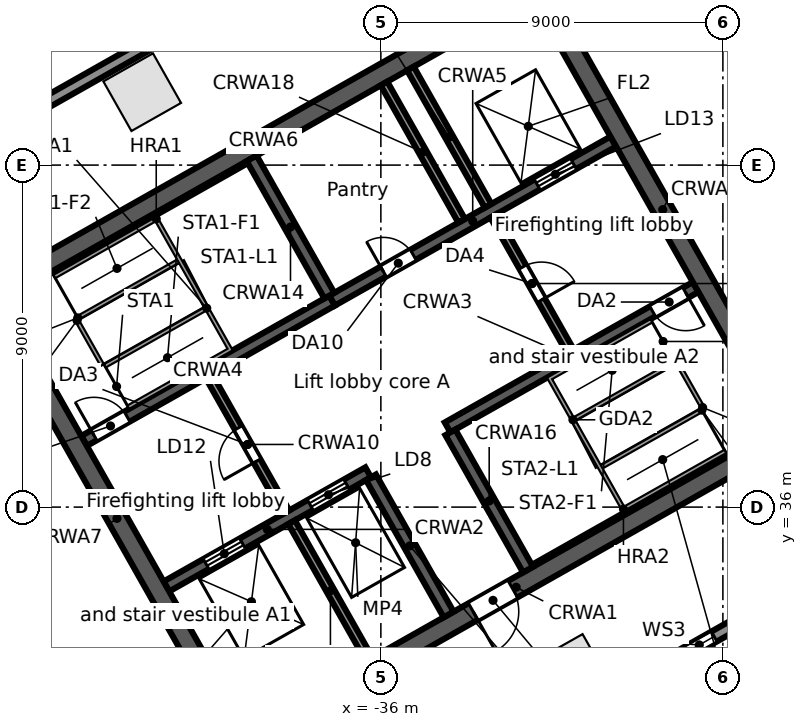
"""IFC4 building model, lengths in metres.
Left out: names, types, materials, properties, quantities, classifications, styles, units other than length and angle.
Written with IfcOpenShell. Run it as: python <this file> out.ifc"""

import sys

from ifc_helpers import new_model, si_unit, direction, frame, frame_2d, origin, origin_2d, place, context, subcontext, project, spatial, rectangle, extrude, element, fill, save


model = new_model("IFC4")
c1 = context("Model", 3, precision=1e-05, world=origin(), true_north=direction((0.0, 1.0)))
c2 = subcontext(c1, "Body", "Model", "MODEL_VIEW")
j1 = project(units=[si_unit("LENGTHUNIT", "METRE"), si_unit("PLANEANGLEUNIT", "RADIAN")], contexts=[c1])
p1 = place(None, origin())
s1 = spatial("IfcSite", under=j1, at=p1, CompositionType="ELEMENT")
p2 = place(p1, origin())
s2 = spatial("IfcBuilding", under=s1, at=p2, CompositionType="ELEMENT")
p3 = place(p2, frame((0.0, 0.0, 198.9)))
s3 = spatial("IfcBuildingStorey", under=s2, at=p3, CompositionType="ELEMENT", Elevation=198.9)
for number, where, z_axis, x_axis in (
    (1, (-42.28, 46.919, 0.0), (0.0, 0.0, 1.0), (-0.87, -0.492, 0.0)),
    (2, (-30.976, 31.635, 0.0), (0.0, 0.0, 1.0), (0.87, 0.492, 0.0)),
):
    element("IfcColumn", number, at=place(p3, frame(where, z_axis=z_axis, x_axis=x_axis)), inside=s3, PredefinedType="COLUMN", context=c2, shape_type="SweptSolid", body=[
        extrude(rectangle(XDim=1.5, YDim=1.5, at=origin_2d()), origin(), (0.0, 0.0, 1.0), 4.0),
    ])
p4 = place(p3, frame((-0.055, 47.969, 0.0), z_axis=(0.0, 0.0, 1.0), x_axis=(-0.870355730478, -0.492423499058, 0.0)))
e3 = element("IfcWall", 3, at=p4, inside=s3, PredefinedType="STANDARD", context=c2, shape_type="SweptSolid", body=[
    extrude(rectangle(XDim=43.75, YDim=0.3, at=frame_2d((21.875, 0.0))), origin(), (0.0, 0.0, 1.0), 3.65),
])
p5 = place(p4, frame((39.977, 0.0, 0.6)))
e4 = element("IfcOpeningElement", 4, at=p5, cuts=e3, PredefinedType="OPENING", context=c2, shape_type="SweptSolid", body=[
    extrude(rectangle(XDim=0.9, YDim=2.4, at=frame_2d((0.45, 1.2))), frame((0.0, 0.16, 0.0), z_axis=(0.0, -1.0, 0.0), x_axis=(1.0, 0.0, 0.0)), (0.0, 0.0, 1.0), 0.32),
])
p6 = place(p4, frame((37.338, 0.0, 0.0)))
e5 = element("IfcOpeningElement", 5, at=p6, cuts=e3, PredefinedType="OPENING", context=c2, shape_type="SweptSolid", body=[
    extrude(rectangle(XDim=1.8, YDim=2.4, at=frame_2d((0.9, 1.2))), frame((0.0, 0.16, 0.0), z_axis=(0.0, -1.0, 0.0), x_axis=(1.0, 0.0, 0.0)), (0.0, 0.0, 1.0), 0.32),
])
p7 = place(p4, frame((31.222, 0.0, 0.6)))
e6 = element("IfcOpeningElement", 6, at=p7, cuts=e3, PredefinedType="OPENING", context=c2, shape_type="SweptSolid", body=[
    extrude(rectangle(XDim=0.9, YDim=2.4, at=frame_2d((0.45, 1.2))), frame((0.0, 0.16, 0.0), z_axis=(0.0, -1.0, 0.0), x_axis=(1.0, 0.0, 0.0)), (0.0, 0.0, 1.0), 0.32),
])
p8 = place(p4, frame((28.584, 0.0, 0.0)))
e7 = element("IfcOpeningElement", 7, at=p8, cuts=e3, PredefinedType="OPENING", context=c2, shape_type="SweptSolid", body=[
    extrude(rectangle(XDim=1.8, YDim=2.4, at=frame_2d((0.9, 1.2))), frame((0.0, 0.16, 0.0), z_axis=(0.0, -1.0, 0.0), x_axis=(1.0, 0.0, 0.0)), (0.0, 0.0, 1.0), 0.32),
])
p9 = place(p4, frame((22.468, 0.0, 0.6)))
e8 = element("IfcOpeningElement", 8, at=p9, cuts=e3, PredefinedType="OPENING", context=c2, shape_type="SweptSolid", body=[
    extrude(rectangle(XDim=0.9, YDim=2.4, at=frame_2d((0.45, 1.2))), frame((0.0, 0.16, 0.0), z_axis=(0.0, -1.0, 0.0), x_axis=(1.0, 0.0, 0.0)), (0.0, 0.0, 1.0), 0.32),
])
p10 = place(p4, frame((19.829, 0.0, 0.0)))
e9 = element("IfcOpeningElement", 9, at=p10, cuts=e3, PredefinedType="OPENING", context=c2, shape_type="SweptSolid", body=[
    extrude(rectangle(XDim=1.8, YDim=2.4, at=frame_2d((0.9, 1.2))), frame((0.0, 0.16, 0.0), z_axis=(0.0, -1.0, 0.0), x_axis=(1.0, 0.0, 0.0)), (0.0, 0.0, 1.0), 0.32),
])
p11 = place(p4, frame((13.713, 0.0, 0.6)))
e10 = element("IfcOpeningElement", 10, at=p11, cuts=e3, PredefinedType="OPENING", context=c2, shape_type="SweptSolid", body=[
    extrude(rectangle(XDim=0.9, YDim=2.4, at=frame_2d((0.45, 1.2))), frame((0.0, 0.16, 0.0), z_axis=(0.0, -1.0, 0.0), x_axis=(1.0, 0.0, 0.0)), (0.0, 0.0, 1.0), 0.32),
])
p12 = place(p4, frame((11.075, 0.0, 0.0)))
e11 = element("IfcOpeningElement", 11, at=p12, cuts=e3, PredefinedType="OPENING", context=c2, shape_type="SweptSolid", body=[
    extrude(rectangle(XDim=1.8, YDim=2.4, at=frame_2d((0.9, 1.2))), frame((0.0, 0.16, 0.0), z_axis=(0.0, -1.0, 0.0), x_axis=(1.0, 0.0, 0.0)), (0.0, 0.0, 1.0), 0.32),
])
p13 = place(p4, frame((4.959, 0.0, 0.6)))
e12 = element("IfcOpeningElement", 12, at=p13, cuts=e3, PredefinedType="OPENING", context=c2, shape_type="SweptSolid", body=[
    extrude(rectangle(XDim=0.9, YDim=2.4, at=frame_2d((0.45, 1.2))), frame((0.0, 0.16, 0.0), z_axis=(0.0, -1.0, 0.0), x_axis=(1.0, 0.0, 0.0)), (0.0, 0.0, 1.0), 0.32),
])
p14 = place(p4, frame((2.32, 0.0, 0.0)))
e13 = element("IfcOpeningElement", 13, at=p14, cuts=e3, PredefinedType="OPENING", context=c2, shape_type="SweptSolid", body=[
    extrude(rectangle(XDim=1.8, YDim=2.4, at=frame_2d((0.9, 1.2))), frame((0.0, 0.16, 0.0), z_axis=(0.0, -1.0, 0.0), x_axis=(1.0, 0.0, 0.0)), (0.0, 0.0, 1.0), 0.32),
])
p15 = place(p3, frame((-58.745, 38.764, 0.0), z_axis=(0.0, 0.0, 1.0), x_axis=(0.870355811726, 0.492423355453, 0.0)))
e14 = element("IfcWall", 14, at=p15, inside=s3, PredefinedType="STANDARD", context=c2, shape_type="SweptSolid", body=[
    extrude(rectangle(XDim=64.025, YDim=0.3, at=frame_2d((32.013, 0.0))), origin(), (0.0, 0.0, 1.0), 3.65),
])
p16 = place(p15, frame((60.122, 0.0, 0.6)))
e15 = element("IfcOpeningElement", 15, at=p16, cuts=e14, PredefinedType="OPENING", context=c2, shape_type="SweptSolid", body=[
    extrude(rectangle(XDim=0.9, YDim=2.4, at=frame_2d((0.45, 1.2))), frame((0.0, 0.16, 0.0), z_axis=(0.0, -1.0, 0.0), x_axis=(1.0, 0.0, 0.0)), (0.0, 0.0, 1.0), 0.32),
])
p17 = place(p15, frame((50.992, 0.0, 0.6)))
e16 = element("IfcOpeningElement", 16, at=p17, cuts=e14, PredefinedType="OPENING", context=c2, shape_type="SweptSolid", body=[
    extrude(rectangle(XDim=0.9, YDim=2.4, at=frame_2d((0.45, 1.2))), frame((0.0, 0.16, 0.0), z_axis=(0.0, -1.0, 0.0), x_axis=(1.0, 0.0, 0.0)), (0.0, 0.0, 1.0), 0.32),
])
p18 = place(p15, frame((41.862, 0.0, 0.6)))
e17 = element("IfcOpeningElement", 17, at=p18, cuts=e14, PredefinedType="OPENING", context=c2, shape_type="SweptSolid", body=[
    extrude(rectangle(XDim=0.9, YDim=2.4, at=frame_2d((0.45, 1.2))), frame((0.0, 0.16, 0.0), z_axis=(0.0, -1.0, 0.0), x_axis=(1.0, 0.0, 0.0)), (0.0, 0.0, 1.0), 0.32),
])
p19 = place(p15, frame((32.732, 0.0, 0.6)))
e18 = element("IfcOpeningElement", 18, at=p19, cuts=e14, PredefinedType="OPENING", context=c2, shape_type="SweptSolid", body=[
    extrude(rectangle(XDim=0.9, YDim=2.4, at=frame_2d((0.45, 1.2))), frame((0.0, 0.16, 0.0), z_axis=(0.0, -1.0, 0.0), x_axis=(1.0, 0.0, 0.0)), (0.0, 0.0, 1.0), 0.32),
])
p20 = place(p15, frame((23.602, 0.0, 0.6)))
e19 = element("IfcOpeningElement", 19, at=p20, cuts=e14, PredefinedType="OPENING", context=c2, shape_type="SweptSolid", body=[
    extrude(rectangle(XDim=0.9, YDim=2.4, at=frame_2d((0.45, 1.2))), frame((0.0, 0.16, 0.0), z_axis=(0.0, -1.0, 0.0), x_axis=(1.0, 0.0, 0.0)), (0.0, 0.0, 1.0), 0.32),
])
p21 = place(p15, frame((14.472, 0.0, 0.6)))
e20 = element("IfcOpeningElement", 20, at=p21, cuts=e14, PredefinedType="OPENING", context=c2, shape_type="SweptSolid", body=[
    extrude(rectangle(XDim=0.9, YDim=2.4, at=frame_2d((0.45, 1.2))), frame((0.0, 0.16, 0.0), z_axis=(0.0, -1.0, 0.0), x_axis=(1.0, 0.0, 0.0)), (0.0, 0.0, 1.0), 0.32),
])
p22 = place(p15, frame((5.342, 0.0, 0.6)))
e21 = element("IfcOpeningElement", 21, at=p22, cuts=e14, PredefinedType="OPENING", context=c2, shape_type="SweptSolid", body=[
    extrude(rectangle(XDim=0.9, YDim=2.4, at=frame_2d((0.45, 1.2))), frame((0.0, 0.16, 0.0), z_axis=(0.0, -1.0, 0.0), x_axis=(1.0, 0.0, 0.0)), (0.0, 0.0, 1.0), 0.32),
])
p23 = place(p3, frame((-44.109, 26.504, 0.0), z_axis=(0.0, 0.0, 1.0), x_axis=(-0.857169502585, 0.515034410344, 0.0)))
e22 = element("IfcWall", 22, at=p23, inside=s3, PredefinedType="STANDARD", context=c2, shape_type="SweptSolid", body=[
    extrude(rectangle(XDim=17.127, YDim=0.3, at=frame_2d((8.563, 0.0))), origin(), (0.0, 0.0, 1.0), 3.65),
])
p24 = place(p23, frame((13.403, 0.0, 0.6)))
e23 = element("IfcOpeningElement", 23, at=p24, cuts=e22, PredefinedType="OPENING", context=c2, shape_type="SweptSolid", body=[
    extrude(rectangle(XDim=0.9, YDim=2.4, at=frame_2d((0.45, 1.2))), frame((0.0, 0.16, 0.0), z_axis=(0.0, -1.0, 0.0), x_axis=(1.0, 0.0, 0.0)), (0.0, 0.0, 1.0), 0.32),
])
p25 = place(p23, frame((4.903, 0.0, 0.6)))
e24 = element("IfcOpeningElement", 24, at=p25, cuts=e22, PredefinedType="OPENING", context=c2, shape_type="SweptSolid", body=[
    extrude(rectangle(XDim=0.9, YDim=2.4, at=frame_2d((0.45, 1.2))), frame((0.0, 0.16, 0.0), z_axis=(0.0, -1.0, 0.0), x_axis=(1.0, 0.0, 0.0)), (0.0, 0.0, 1.0), 0.32),
])
p26 = place(p3, frame((-39.838, 29.705, 0.0), z_axis=(0.0, 0.0, 1.0), x_axis=(0.870350116061, 0.492433422375, 0.0)))
e25 = element("IfcWall", 25, at=p26, inside=s3, PredefinedType="SOLIDWALL", context=c2, shape_type="SweptSolid", body=[
    extrude(rectangle(XDim=17.0, YDim=0.5, at=frame_2d((8.5, 0.0))), origin(), (0.0, 0.0, 1.0), 3.65),
])
p27 = place(p26, frame((7.2, 0.0, 0.0)))
e26 = element("IfcOpeningElement", 26, at=p27, cuts=e25, PredefinedType="OPENING", context=c2, shape_type="SweptSolid", body=[
    extrude(rectangle(XDim=1.2, YDim=2.1, at=frame_2d((0.6, 1.05))), frame((0.0, 0.26, 0.0), z_axis=(0.0, -1.0, 0.0), x_axis=(1.0, 0.0, 0.0)), (0.0, 0.0, 1.0), 0.52),
])
p28 = place(p3, frame((-41.643, 33.912, 0.0), z_axis=(0.0, 0.0, 1.0), x_axis=(0.870343599782, 0.492444939378, 0.0)))
e27 = element("IfcWall", 27, at=p28, inside=s3, PredefinedType="SOLIDWALL", context=c2, shape_type="SweptSolid", body=[
    extrude(rectangle(XDim=6.1, YDim=0.3, at=frame_2d((3.05, 0.0))), origin(), (0.0, 0.0, 1.0), 3.65),
])
p29 = place(p28, frame((1.2, 0.0, 0.0)))
e28 = element("IfcOpeningElement", 28, at=p29, cuts=e27, PredefinedType="OPENING", context=c2, shape_type="SweptSolid", body=[
    extrude(rectangle(XDim=1.1, YDim=2.1, at=frame_2d((0.55, 1.05))), frame((0.0, 0.16, 0.0), z_axis=(0.0, -1.0, 0.0), x_axis=(1.0, 0.0, 0.0)), (0.0, 0.0, 1.0), 0.32),
])
p30 = place(p28, frame((4.35, 0.0, 0.0)))
e29 = element("IfcOpeningElement", 29, at=p30, cuts=e27, PredefinedType="OPENING", context=c2, shape_type="SweptSolid", body=[
    extrude(rectangle(XDim=1.1, YDim=2.1, at=frame_2d((0.55, 1.05))), frame((0.0, 0.16, 0.0), z_axis=(0.0, -1.0, 0.0), x_axis=(1.0, 0.0, 0.0)), (0.0, 0.0, 1.0), 0.32),
])
p31 = place(p3, frame((-34.245, 38.097, 0.0), z_axis=(0.0, 0.0, 1.0), x_axis=(0.870364520461, 0.492407962489, 0.0)))
e30 = element("IfcWall", 30, at=p31, inside=s3, PredefinedType="SOLIDWALL", context=c2, shape_type="SweptSolid", body=[
    extrude(rectangle(XDim=7.5, YDim=0.3, at=frame_2d((3.75, 0.0))), origin(), (0.0, 0.0, 1.0), 3.65),
])
p32 = place(p31, frame((6.2, 0.0, 0.0)))
e31 = element("IfcOpeningElement", 31, at=p32, cuts=e30, PredefinedType="OPENING", context=c2, shape_type="SweptSolid", body=[
    extrude(rectangle(XDim=1.0, YDim=2.1, at=frame_2d((0.5, 1.05))), frame((0.0, 0.16, 0.0), z_axis=(0.0, -1.0, 0.0), x_axis=(1.0, 0.0, 0.0)), (0.0, 0.0, 1.0), 0.32),
])
p33 = place(p3, frame((-43.81, 37.741, 0.0), z_axis=(0.0, 0.0, 1.0), x_axis=(0.870350569555, 0.492432620848, 0.0)))
e32 = element("IfcWall", 32, at=p33, inside=s3, PredefinedType="SOLIDWALL", context=c2, shape_type="SweptSolid", body=[
    extrude(rectangle(XDim=7.5, YDim=0.3, at=frame_2d((3.75, 0.0))), origin(), (0.0, 0.0, 1.0), 3.65),
])
p34 = place(p33, frame((0.3, 0.0, 0.0)))
e33 = element("IfcOpeningElement", 33, at=p34, cuts=e32, PredefinedType="OPENING", context=c2, shape_type="SweptSolid", body=[
    extrude(rectangle(XDim=1.0, YDim=2.1, at=frame_2d((0.5, 1.05))), frame((0.0, 0.16, 0.0), z_axis=(0.0, -1.0, 0.0), x_axis=(1.0, 0.0, 0.0)), (0.0, 0.0, 1.0), 0.32),
])
p35 = place(p3, frame((-37.282, 41.435, 0.0), z_axis=(0.0, 0.0, 1.0), x_axis=(0.870356271124, 0.492422543467, 0.0)))
e34 = element("IfcWall", 34, at=p35, inside=s3, PredefinedType="SOLIDWALL", context=c2, shape_type="SweptSolid", body=[
    extrude(rectangle(XDim=8.5, YDim=0.3, at=frame_2d((4.25, 0.0))), origin(), (0.0, 0.0, 1.0), 3.65),
])
p36 = place(p35, frame((6.2, 0.0, 0.0)))
e35 = element("IfcOpeningElement", 35, at=p36, cuts=e34, PredefinedType="OPENING", context=c2, shape_type="SweptSolid", body=[
    extrude(rectangle(XDim=1.1, YDim=2.1, at=frame_2d((0.55, 1.05))), frame((0.0, 0.16, 0.0), z_axis=(0.0, -1.0, 0.0), x_axis=(1.0, 0.0, 0.0)), (0.0, 0.0, 1.0), 0.32),
])
p37 = place(p35, frame((1.55, 0.0, 0.0)))
e36 = element("IfcOpeningElement", 36, at=p37, cuts=e34, PredefinedType="OPENING", context=c2, shape_type="SweptSolid", body=[
    extrude(rectangle(XDim=0.9, YDim=2.1, at=frame_2d((0.45, 1.05))), frame((0.0, 0.16, 0.0), z_axis=(0.0, -1.0, 0.0), x_axis=(1.0, 0.0, 0.0)), (0.0, 0.0, 1.0), 0.32),
])
p38 = place(p3, frame((-46.486, 41.455, 0.0), z_axis=(0.0, 0.0, 1.0), x_axis=(0.870353598469, 0.492427267353, 0.0)))
e37 = element("IfcWall", 37, at=p38, inside=s3, PredefinedType="SOLIDWALL", context=c2, shape_type="SweptSolid", body=[
    extrude(rectangle(XDim=17.0, YDim=0.5, at=frame_2d((8.5, 0.0))), origin(), (0.0, 0.0, 1.0), 3.65),
])
p39 = place(p3, frame((-46.145, 41.361, 0.0), z_axis=(0.0, 0.0, 1.0), x_axis=(0.492435316254, -0.870349044525, 0.0)))
e38 = element("IfcWall", 38, at=p39, inside=s3, PredefinedType="SOLIDWALL", context=c2, shape_type="SweptSolid", body=[
    extrude(rectangle(XDim=13.0, YDim=0.5, at=frame_2d((6.5, 0.0))), origin(), (0.0, 0.0, 1.0), 3.65),
])
p40 = place(p3, frame((-38.349, 35.603, 0.0), z_axis=(0.0, 0.0, 1.0), x_axis=(0.492396453737, -0.870371031427, 0.0)))
e39 = element("IfcWall", 39, at=p40, inside=s3, PredefinedType="SOLIDWALL", context=c2, shape_type="SweptSolid", body=[
    extrude(rectangle(XDim=4.15, YDim=0.2, at=frame_2d((2.075, 0.0))), origin(), (0.0, 0.0, 1.0), 3.65),
])
p41 = place(p3, frame((-40.516, 39.433, 0.0), z_axis=(0.0, 0.0, 1.0), x_axis=(0.492453559952, -0.87033872216, 0.0)))
e40 = element("IfcWall", 40, at=p41, inside=s3, PredefinedType="PARTITIONING", context=c2, shape_type="SweptSolid", body=[
    extrude(rectangle(XDim=4.1, YDim=0.2, at=frame_2d((2.05, 0.0))), origin(), (0.0, 0.0, 1.0), 3.65),
])
p42 = place(p41, frame((1.55, 0.0, 0.0)))
e41 = element("IfcOpeningElement", 41, at=p42, cuts=e40, PredefinedType="OPENING", context=c2, shape_type="SweptSolid", body=[
    extrude(rectangle(XDim=1.0, YDim=2.1, at=frame_2d((0.5, 1.05))), frame((0.0, 0.11, 0.0), z_axis=(0.0, -1.0, 0.0), x_axis=(1.0, 0.0, 0.0)), (0.0, 0.0, 1.0), 0.22),
])
for number, where, z_axis, x_axis in (
    (42, (-36.26, 36.785, 0.0), (0.0, 0.0, 1.0), (0.492, -0.87, 0.0)),
    (43, (-39.399, 45.177, 0.0), (0.0, 0.0, 1.0), (0.492, -0.87, 0.0)),
    (44, (-34.171, 37.967, 0.0), (0.0, 0.0, 1.0), (0.492, -0.87, 0.0)),
):
    element("IfcWall", number, at=place(p3, frame(where, z_axis=z_axis, x_axis=x_axis)), inside=s3, PredefinedType="SOLIDWALL", context=c2, shape_type="SweptSolid", body=[
        extrude(rectangle(XDim=4.15, YDim=0.3, at=frame_2d((2.075, 0.0))), origin(), (0.0, 0.0, 1.0), 3.65),
    ])
p43 = place(p3, frame((-35.918, 47.147, 0.0), z_axis=(0.0, 0.0, 1.0), x_axis=(0.492441017253, -0.870345818929, 0.0)))
e45 = element("IfcWall", 45, at=p43, inside=s3, PredefinedType="SOLIDWALL", context=c2, shape_type="SweptSolid", body=[
    extrude(rectangle(XDim=4.15, YDim=0.2, at=frame_2d((2.075, 0.0))), origin(), (0.0, 0.0, 1.0), 3.65),
])
p44 = place(p3, frame((-33.031, 43.667, 0.0), z_axis=(0.0, 0.0, 1.0), x_axis=(0.492408451753, -0.87036424366, 0.0)))
e46 = element("IfcWall", 46, at=p44, inside=s3, PredefinedType="PARTITIONING", context=c2, shape_type="SweptSolid", body=[
    extrude(rectangle(XDim=4.1, YDim=0.2, at=frame_2d((2.05, 0.0))), origin(), (0.0, 0.0, 1.0), 3.65),
])
p45 = place(p44, frame((1.55, 0.0, 0.0)))
e47 = element("IfcOpeningElement", 47, at=p45, cuts=e46, PredefinedType="OPENING", context=c2, shape_type="SweptSolid", body=[
    extrude(rectangle(XDim=1.0, YDim=2.1, at=frame_2d((0.5, 1.05))), frame((0.0, 0.11, 0.0), z_axis=(0.0, -1.0, 0.0), x_axis=(1.0, 0.0, 0.0)), (0.0, 0.0, 1.0), 0.22),
])
p46 = place(p3, frame((-35.222, 47.541, 0.0), z_axis=(0.0, 0.0, 1.0), x_axis=(0.492421666909, -0.870356767055, 0.0)))
e48 = element("IfcWall", 48, at=p46, inside=s3, PredefinedType="SOLIDWALL", context=c2, shape_type="SweptSolid", body=[
    extrude(rectangle(XDim=4.15, YDim=0.2, at=frame_2d((2.075, 0.0))), origin(), (0.0, 0.0, 1.0), 3.65),
])
p47 = place(p3, frame((-31.784, 49.486, 0.0), z_axis=(0.0, 0.0, 1.0), x_axis=(0.492435316254, -0.870349044525, 0.0)))
e49 = element("IfcWall", 49, at=p47, inside=s3, PredefinedType="SOLIDWALL", context=c2, shape_type="SweptSolid", body=[
    extrude(rectangle(XDim=13.0, YDim=0.5, at=frame_2d((6.5, 0.0))), origin(), (0.0, 0.0, 1.0), 3.65),
])
p48 = place(p7, origin())
e50 = element("IfcWindow", 50, at=p48, inside=s3, PartitioningType="SINGLE_PANEL", PredefinedType="WINDOW", context=c2, shape_type="SweptSolid", body=[
    extrude(rectangle(XDim=0.9, YDim=2.4, at=frame_2d((0.45, 1.2))), frame((0.0, 0.03, 0.0), z_axis=(0.0, -1.0, 0.0), x_axis=(1.0, 0.0, 0.0)), (0.0, 0.0, 1.0), 0.06),
])
fill(e6, e50)
p49 = place(p36, origin())
e51 = element("IfcDoor", 51, at=p49, inside=s3, OperationType="DOUBLE_DOOR_SLIDING", PredefinedType="DOOR", context=c2, shape_type="SweptSolid", body=[
    extrude(rectangle(XDim=1.1, YDim=2.1, at=frame_2d((0.55, 1.05))), frame((0.0, 0.025, 0.0), z_axis=(0.0, -1.0, 0.0), x_axis=(1.0, 0.0, 0.0)), (0.0, 0.0, 1.0), 0.05),
])
fill(e35, e51)
p50 = place(p29, origin())
e52 = element("IfcDoor", 52, at=p50, inside=s3, OperationType="DOUBLE_DOOR_SLIDING", PredefinedType="DOOR", context=c2, shape_type="SweptSolid", body=[
    extrude(rectangle(XDim=1.1, YDim=2.1, at=frame_2d((0.55, 1.05))), frame((0.0, 0.025, 0.0), z_axis=(0.0, -1.0, 0.0), x_axis=(1.0, 0.0, 0.0)), (0.0, 0.0, 1.0), 0.05),
])
fill(e28, e52)
p51 = place(p30, origin())
e53 = element("IfcDoor", 53, at=p51, inside=s3, OperationType="DOUBLE_DOOR_SLIDING", PredefinedType="DOOR", context=c2, shape_type="SweptSolid", body=[
    extrude(rectangle(XDim=1.1, YDim=2.1, at=frame_2d((0.55, 1.05))), frame((0.0, 0.025, 0.0), z_axis=(0.0, -1.0, 0.0), x_axis=(1.0, 0.0, 0.0)), (0.0, 0.0, 1.0), 0.05),
])
fill(e29, e53)
p52 = place(p34, origin())
e54 = element("IfcDoor", 54, at=p52, inside=s3, OperationType="SINGLE_SWING_LEFT", PredefinedType="DOOR", context=c2, shape_type="SweptSolid", body=[
    extrude(rectangle(XDim=1.0, YDim=2.1, at=frame_2d((0.5, 1.05))), frame((0.0, 0.025, 0.0), z_axis=(0.0, -1.0, 0.0), x_axis=(1.0, 0.0, 0.0)), (0.0, 0.0, 1.0), 0.05),
])
fill(e33, e54)
p53 = place(p32, frame((1.0, 0.0, 0.0), z_axis=(0.0, 0.0, 1.0), x_axis=(-1.0, 0.0, 0.0)))
e55 = element("IfcDoor", 55, at=p53, inside=s3, OperationType="SINGLE_SWING_LEFT", PredefinedType="DOOR", context=c2, shape_type="SweptSolid", body=[
    extrude(rectangle(XDim=1.0, YDim=2.1, at=frame_2d((0.5, 1.05))), frame((0.0, 0.025, 0.0), z_axis=(0.0, -1.0, 0.0), x_axis=(1.0, 0.0, 0.0)), (0.0, 0.0, 1.0), 0.05),
])
fill(e31, e55)
p54 = place(p42, frame((1.0, 0.0, 0.0), z_axis=(0.0, 0.0, 1.0), x_axis=(-1.0, 0.0, 0.0)))
e56 = element("IfcDoor", 56, at=p54, inside=s3, OperationType="SINGLE_SWING_LEFT", PredefinedType="DOOR", context=c2, shape_type="SweptSolid", body=[
    extrude(rectangle(XDim=1.0, YDim=2.1, at=frame_2d((0.5, 1.05))), frame((0.0, 0.025, 0.0), z_axis=(0.0, -1.0, 0.0), x_axis=(1.0, 0.0, 0.0)), (0.0, 0.0, 1.0), 0.05),
])
fill(e41, e56)
p55 = place(p45, origin())
e57 = element("IfcDoor", 57, at=p55, inside=s3, OperationType="SINGLE_SWING_RIGHT", PredefinedType="DOOR", context=c2, shape_type="SweptSolid", body=[
    extrude(rectangle(XDim=1.0, YDim=2.1, at=frame_2d((0.5, 1.05))), frame((0.0, 0.025, 0.0), z_axis=(0.0, -1.0, 0.0), x_axis=(1.0, 0.0, 0.0)), (0.0, 0.0, 1.0), 0.05),
])
fill(e47, e57)
p56 = place(p27, frame((1.2, 0.0, 0.0), z_axis=(0.0, 0.0, 1.0), x_axis=(-1.0, 0.0, 0.0)))
e58 = element("IfcDoor", 58, at=p56, inside=s3, OperationType="SINGLE_SWING_RIGHT", PredefinedType="DOOR", context=c2, shape_type="SweptSolid", body=[
    extrude(rectangle(XDim=1.2, YDim=2.1, at=frame_2d((0.6, 1.05))), frame((0.0, 0.025, 0.0), z_axis=(0.0, -1.0, 0.0), x_axis=(1.0, 0.0, 0.0)), (0.0, 0.0, 1.0), 0.05),
])
fill(e26, e58)
p57 = place(p37, origin())
e59 = element("IfcDoor", 59, at=p57, inside=s3, OperationType="SINGLE_SWING_LEFT", PredefinedType="DOOR", context=c2, shape_type="SweptSolid", body=[
    extrude(rectangle(XDim=0.9, YDim=2.1, at=frame_2d((0.45, 1.05))), frame((0.0, 0.025, 0.0), z_axis=(0.0, -1.0, 0.0), x_axis=(1.0, 0.0, 0.0)), (0.0, 0.0, 1.0), 0.05),
])
fill(e36, e59)
save(model, sys.argv[1])
